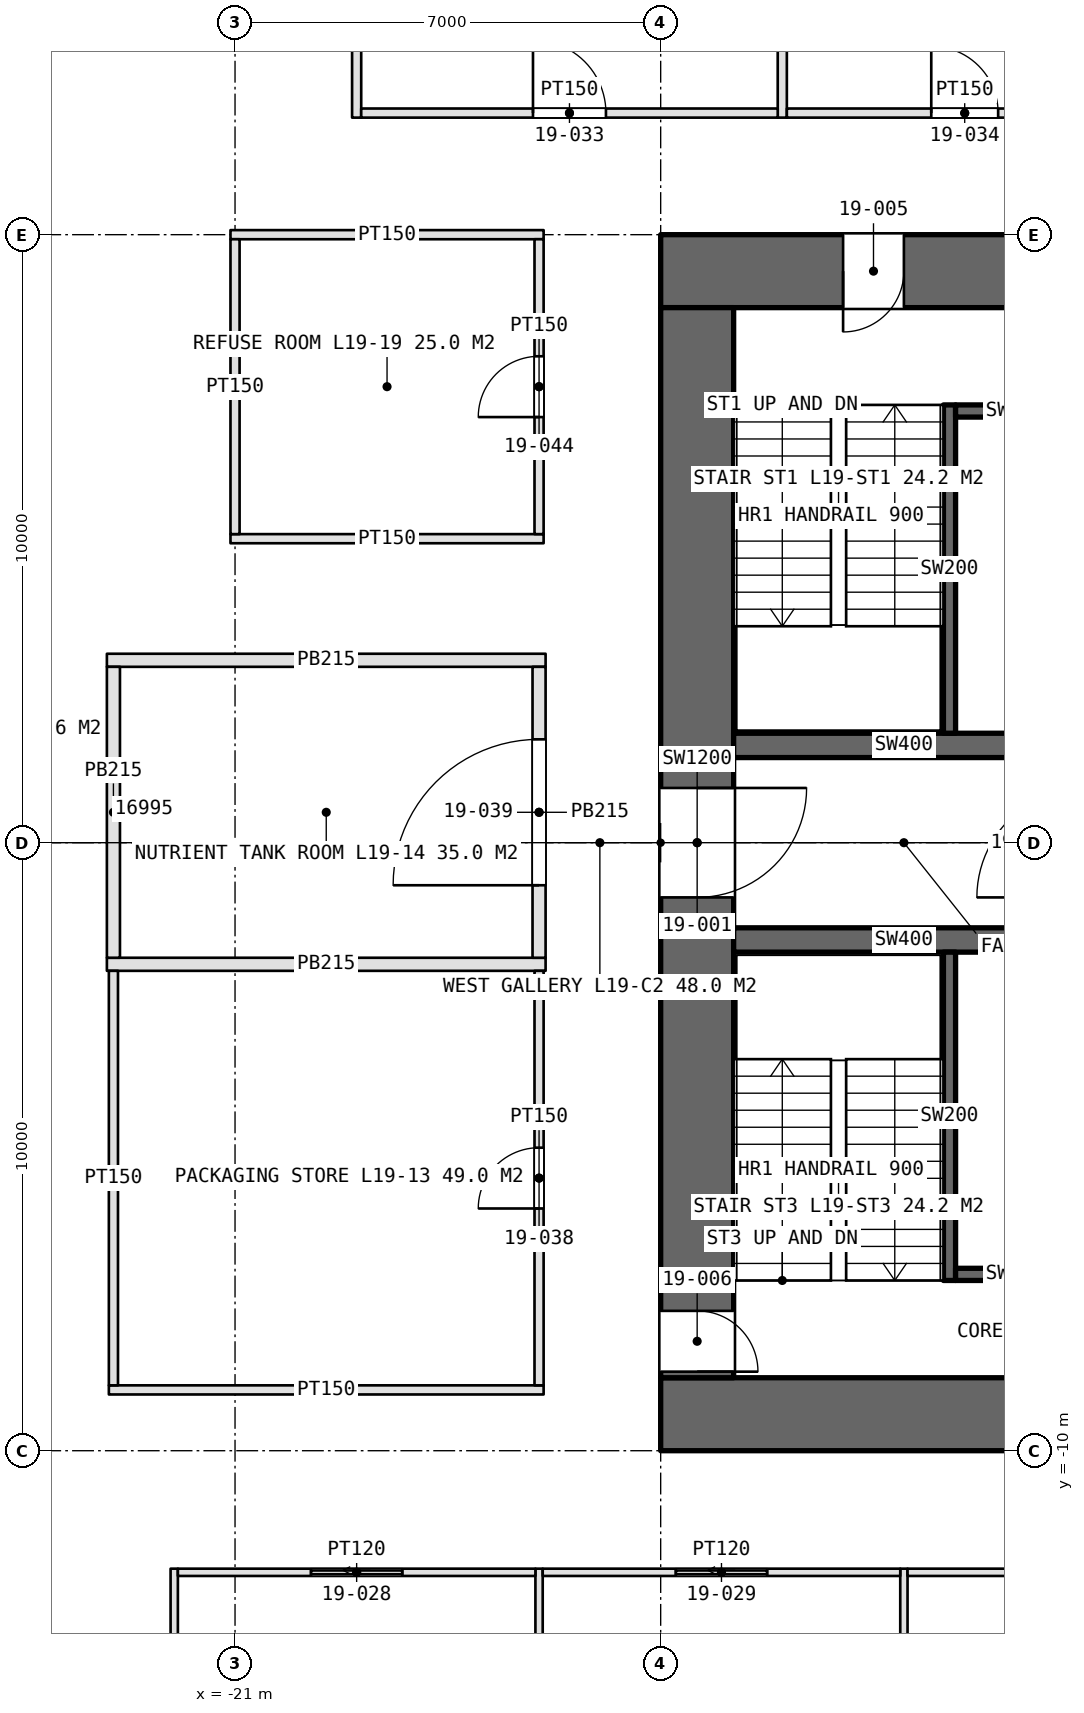
"""IFC4 building model, lengths in metres.
Left out: names, types, materials, properties, quantities, classifications, styles, units other than length and angle.
Written with IfcOpenShell. Run it as: python <this file> out.ifc"""

import sys

from ifc_helpers import new_model, si_unit, direction, frame, frame_2d, origin, place, context, subcontext, project, spatial, rectangle, extrude, element, fill, save


model = new_model("IFC4")
c1 = context("Model", 3, precision=1e-05, world=origin(), true_north=direction((0.0, 1.0)))
c2 = subcontext(c1, "Body", "Model", "MODEL_VIEW")
j1 = project(units=[si_unit("LENGTHUNIT", "METRE"), si_unit("PLANEANGLEUNIT", "RADIAN")], contexts=[c1])
p1 = place(None, origin())
s1 = spatial("IfcSite", under=j1, at=p1, CompositionType="ELEMENT")
p2 = place(p1, origin())
s2 = spatial("IfcBuilding", under=s1, at=p2, CompositionType="ELEMENT")
p3 = place(p2, frame((0.0, 0.0, 95.0)))
s3 = spatial("IfcBuildingStorey", under=s2, at=p3, CompositionType="ELEMENT", Elevation=95.0)
p4 = place(p3, frame((-14.0, -9.4, 0.0), z_axis=(0.0, 0.0, 1.0), x_axis=(1.0, 0.0, 0.0)))
e1 = element("IfcWall", 1, at=p4, inside=s3, PredefinedType="SHEAR", context=c2, shape_type="SweptSolid", body=[
    extrude(rectangle(XDim=28.0, YDim=1.2, at=frame_2d((14.0, 0.0))), origin(), (0.0, 0.0, 1.0), 5.0),
])
p5 = place(p4, frame((13.1, 0.0, 0.0)))
e2 = element("IfcOpeningElement", 2, at=p5, cuts=e1, PredefinedType="OPENING", context=c2, shape_type="SweptSolid", body=[
    extrude(rectangle(XDim=1.8, YDim=2.4, at=frame_2d((0.9, 1.2))), frame((0.0, 0.61, 0.0), z_axis=(0.0, -1.0, 0.0), x_axis=(1.0, 0.0, 0.0)), (0.0, 0.0, 1.0), 1.22),
])
p6 = place(p4, frame((22.9, 0.0, 0.0)))
e3 = element("IfcOpeningElement", 3, at=p6, cuts=e1, PredefinedType="OPENING", context=c2, shape_type="SweptSolid", body=[
    extrude(rectangle(XDim=2.2, YDim=2.7, at=frame_2d((1.1, 1.35))), frame((0.0, 0.61, 0.0), z_axis=(0.0, -1.0, 0.0), x_axis=(1.0, 0.0, 0.0)), (0.0, 0.0, 1.0), 1.22),
])
p7 = place(p3, frame((14.0, 9.4, 0.0), z_axis=(0.0, 0.0, 1.0), x_axis=(-1.0, 0.0, 0.0)))
e4 = element("IfcWall", 4, at=p7, inside=s3, PredefinedType="SHEAR", context=c2, shape_type="SweptSolid", body=[
    extrude(rectangle(XDim=28.0, YDim=1.2, at=frame_2d((14.0, 0.0))), origin(), (0.0, 0.0, 1.0), 5.0),
])
p8 = place(p7, frame((24.0, 0.0, 0.0)))
e5 = element("IfcOpeningElement", 5, at=p8, cuts=e4, PredefinedType="OPENING", context=c2, shape_type="SweptSolid", body=[
    extrude(rectangle(XDim=1.0, YDim=2.4, at=frame_2d((0.5, 1.2))), frame((0.0, 0.61, 0.0), z_axis=(0.0, -1.0, 0.0), x_axis=(1.0, 0.0, 0.0)), (0.0, 0.0, 1.0), 1.22),
])
p9 = place(p7, frame((13.1, 0.0, 0.0)))
e6 = element("IfcOpeningElement", 6, at=p9, cuts=e4, PredefinedType="OPENING", context=c2, shape_type="SweptSolid", body=[
    extrude(rectangle(XDim=1.8, YDim=2.4, at=frame_2d((0.9, 1.2))), frame((0.0, 0.61, 0.0), z_axis=(0.0, -1.0, 0.0), x_axis=(1.0, 0.0, 0.0)), (0.0, 0.0, 1.0), 1.22),
])
p10 = place(p3, frame((-13.4, 8.8, 0.0), z_axis=(0.0, 0.0, 1.0), x_axis=(0.0, -1.0, 0.0)))
e7 = element("IfcWall", 7, at=p10, inside=s3, PredefinedType="SHEAR", context=c2, shape_type="SweptSolid", body=[
    extrude(rectangle(XDim=17.6, YDim=1.2, at=frame_2d((8.8, 0.0))), origin(), (0.0, 0.0, 1.0), 5.0),
])
p11 = place(p10, frame((7.9, 0.0, 0.0)))
e8 = element("IfcOpeningElement", 8, at=p11, cuts=e7, PredefinedType="OPENING", context=c2, shape_type="SweptSolid", body=[
    extrude(rectangle(XDim=1.8, YDim=2.4, at=frame_2d((0.9, 1.2))), frame((0.0, 0.61, 0.0), z_axis=(0.0, -1.0, 0.0), x_axis=(1.0, 0.0, 0.0)), (0.0, 0.0, 1.0), 1.22),
])
p12 = place(p10, frame((16.5, 0.0, 0.0)))
e9 = element("IfcOpeningElement", 9, at=p12, cuts=e7, PredefinedType="OPENING", context=c2, shape_type="SweptSolid", body=[
    extrude(rectangle(XDim=1.0, YDim=2.4, at=frame_2d((0.5, 1.2))), frame((0.0, 0.61, 0.0), z_axis=(0.0, -1.0, 0.0), x_axis=(1.0, 0.0, 0.0)), (0.0, 0.0, 1.0), 1.22),
])
for number, where, z_axis, x_axis in (
    (10, (-12.8, 1.6, 0.0), (0.0, 0.0, 1.0), (1.0, 0.0, 0.0)),
    (11, (-12.8, -1.6, 0.0), (0.0, 0.0, 1.0), (1.0, 0.0, 0.0)),
):
    element("IfcWall", number, at=place(p3, frame(where, z_axis=z_axis, x_axis=x_axis)), inside=s3, PredefinedType="SHEAR", context=c2, shape_type="SweptSolid", body=[
        extrude(rectangle(XDim=5.6, YDim=0.4, at=frame_2d((2.8, 0.0))), origin(), (0.0, 0.0, 1.0), 5.0),
    ])
p13 = place(p3, frame((-9.25, 7.2, 0.0), z_axis=(0.0, 0.0, 1.0), x_axis=(0.0, -1.0, 0.0)))
e12 = element("IfcWall", 12, at=p13, inside=s3, PredefinedType="SOLIDWALL", context=c2, shape_type="SweptSolid", body=[
    extrude(rectangle(XDim=5.4, YDim=0.2, at=frame_2d((2.7, 0.0))), origin(), (0.0, 0.0, 1.0), 5.0),
])
p14 = place(p3, frame((-9.15, 7.1, 0.0), z_axis=(0.0, 0.0, 1.0), x_axis=(1.0, 0.0, 0.0)))
e13 = element("IfcWall", 13, at=p14, inside=s3, PredefinedType="SOLIDWALL", context=c2, shape_type="SweptSolid", body=[
    extrude(rectangle(XDim=1.95, YDim=0.2, at=frame_2d((0.975, 0.0))), origin(), (0.0, 0.0, 1.0), 5.0),
])
p15 = place(p3, frame((-9.25, -7.2, 0.0), z_axis=(0.0, 0.0, 1.0), x_axis=(0.0, 1.0, 0.0)))
e14 = element("IfcWall", 14, at=p15, inside=s3, PredefinedType="SOLIDWALL", context=c2, shape_type="SweptSolid", body=[
    extrude(rectangle(XDim=5.4, YDim=0.2, at=frame_2d((2.7, 0.0))), origin(), (0.0, 0.0, 1.0), 5.0),
])
p16 = place(p3, frame((-9.15, -7.1, 0.0), z_axis=(0.0, 0.0, 1.0), x_axis=(1.0, 0.0, 0.0)))
e15 = element("IfcWall", 15, at=p16, inside=s3, PredefinedType="SOLIDWALL", context=c2, shape_type="SweptSolid", body=[
    extrude(rectangle(XDim=1.95, YDim=0.2, at=frame_2d((0.975, 0.0))), origin(), (0.0, 0.0, 1.0), 5.0),
])
for number, where, z_axis, x_axis in (
    (16, (-22.0, -11.94, 0.0), (0.0, 0.0, 1.0), (0.0, -1.0, 0.0)),
    (17, (-16.0, -11.94, 0.0), (0.0, 0.0, 1.0), (0.0, -1.0, 0.0)),
    (18, (-10.0, -11.94, 0.0), (0.0, 0.0, 1.0), (0.0, -1.0, 0.0)),
):
    element("IfcWall", number, at=place(p3, frame(where, z_axis=z_axis, x_axis=x_axis)), inside=s3, PredefinedType="PARTITIONING", context=c2, shape_type="SweptSolid", body=[
        extrude(rectangle(XDim=6.12, YDim=0.12, at=frame_2d((3.06, 0.0))), origin(), (0.0, 0.0, 1.0), 3.6),
    ])
p17 = place(p3, frame((-21.94, -12.0, 0.0), z_axis=(0.0, 0.0, 1.0), x_axis=(1.0, 0.0, 0.0)))
e19 = element("IfcWall", 19, at=p17, inside=s3, PredefinedType="PARTITIONING", context=c2, shape_type="SweptSolid", body=[
    extrude(rectangle(XDim=5.88, YDim=0.12, at=frame_2d((2.94, 0.0))), origin(), (0.0, 0.0, 1.0), 3.6),
])
p18 = place(p17, frame((2.19, 0.0, 0.0)))
e20 = element("IfcOpeningElement", 20, at=p18, cuts=e19, PredefinedType="OPENING", context=c2, shape_type="SweptSolid", body=[
    extrude(rectangle(XDim=1.5, YDim=2.5, at=frame_2d((0.75, 1.25))), frame((0.0, 0.07, 0.0), z_axis=(0.0, -1.0, 0.0), x_axis=(1.0, 0.0, 0.0)), (0.0, 0.0, 1.0), 0.14),
])
p19 = place(p3, frame((-15.94, -12.0, 0.0), z_axis=(0.0, 0.0, 1.0), x_axis=(1.0, 0.0, 0.0)))
e21 = element("IfcWall", 21, at=p19, inside=s3, PredefinedType="PARTITIONING", context=c2, shape_type="SweptSolid", body=[
    extrude(rectangle(XDim=5.88, YDim=0.12, at=frame_2d((2.94, 0.0))), origin(), (0.0, 0.0, 1.0), 3.6),
])
p20 = place(p19, frame((2.19, 0.0, 0.0)))
e22 = element("IfcOpeningElement", 22, at=p20, cuts=e21, PredefinedType="OPENING", context=c2, shape_type="SweptSolid", body=[
    extrude(rectangle(XDim=1.5, YDim=2.5, at=frame_2d((0.75, 1.25))), frame((0.0, 0.07, 0.0), z_axis=(0.0, -1.0, 0.0), x_axis=(1.0, 0.0, 0.0)), (0.0, 0.0, 1.0), 0.14),
])
p21 = place(p3, frame((-9.94, -12.0, 0.0), z_axis=(0.0, 0.0, 1.0), x_axis=(1.0, 0.0, 0.0)))
e23 = element("IfcWall", 23, at=p21, inside=s3, PredefinedType="PARTITIONING", context=c2, shape_type="SweptSolid", body=[
    extrude(rectangle(XDim=5.88, YDim=0.12, at=frame_2d((2.94, 0.0))), origin(), (0.0, 0.0, 1.0), 3.6),
])
p22 = place(p21, frame((2.19, 0.0, 0.0)))
e24 = element("IfcOpeningElement", 24, at=p22, cuts=e23, PredefinedType="OPENING", context=c2, shape_type="SweptSolid", body=[
    extrude(rectangle(XDim=1.5, YDim=2.5, at=frame_2d((0.75, 1.25))), frame((0.0, 0.07, 0.0), z_axis=(0.0, -1.0, 0.0), x_axis=(1.0, 0.0, 0.0)), (0.0, 0.0, 1.0), 0.14),
])
for number, where, z_axis, x_axis in (
    (25, (-19.0, 11.925, 0.0), (0.0, 0.0, 1.0), (0.0, 1.0, 0.0)),
    (26, (-12.0, 11.925, 0.0), (0.0, 0.0, 1.0), (0.0, 1.0, 0.0)),
):
    element("IfcWall", number, at=place(p3, frame(where, z_axis=z_axis, x_axis=x_axis)), inside=s3, PredefinedType="PARTITIONING", context=c2, shape_type="SweptSolid", body=[
        extrude(rectangle(XDim=8.15, YDim=0.15, at=frame_2d((4.075, 0.0))), origin(), (0.0, 0.0, 1.0), 3.6),
    ])
p23 = place(p3, frame((-18.925, 12.0, 0.0), z_axis=(0.0, 0.0, 1.0), x_axis=(1.0, 0.0, 0.0)))
e27 = element("IfcWall", 27, at=p23, inside=s3, PredefinedType="PARTITIONING", context=c2, shape_type="SweptSolid", body=[
    extrude(rectangle(XDim=6.85, YDim=0.15, at=frame_2d((3.425, 0.0))), origin(), (0.0, 0.0, 1.0), 3.6),
])
p24 = place(p23, frame((2.825, 0.0, 0.0)))
e28 = element("IfcOpeningElement", 28, at=p24, cuts=e27, PredefinedType="OPENING", context=c2, shape_type="SweptSolid", body=[
    extrude(rectangle(XDim=1.2, YDim=2.3, at=frame_2d((0.6, 1.15))), frame((0.0, 0.085, 0.0), z_axis=(0.0, -1.0, 0.0), x_axis=(1.0, 0.0, 0.0)), (0.0, 0.0, 1.0), 0.17),
])
p25 = place(p3, frame((-11.925, 12.0, 0.0), z_axis=(0.0, 0.0, 1.0), x_axis=(1.0, 0.0, 0.0)))
e29 = element("IfcWall", 29, at=p25, inside=s3, PredefinedType="PARTITIONING", context=c2, shape_type="SweptSolid", body=[
    extrude(rectangle(XDim=5.85, YDim=0.15, at=frame_2d((2.925, 0.0))), origin(), (0.0, 0.0, 1.0), 3.6),
])
p26 = place(p25, frame((2.375, 0.0, 0.0)))
e30 = element("IfcOpeningElement", 30, at=p26, cuts=e29, PredefinedType="OPENING", context=c2, shape_type="SweptSolid", body=[
    extrude(rectangle(XDim=1.1, YDim=2.3, at=frame_2d((0.55, 1.15))), frame((0.0, 0.085, 0.0), z_axis=(0.0, -1.0, 0.0), x_axis=(1.0, 0.0, 0.0)), (0.0, 0.0, 1.0), 0.17),
])
p27 = place(p3, frame((-15.925, -9.0, 0.0), z_axis=(0.0, 0.0, 1.0), x_axis=(-1.0, 0.0, 0.0)))
e31 = element("IfcWall", 31, at=p27, inside=s3, PredefinedType="PARTITIONING", context=c2, shape_type="SweptSolid", body=[
    extrude(rectangle(XDim=7.15, YDim=0.15, at=frame_2d((3.575, 0.0))), origin(), (0.0, 0.0, 1.0), 3.6),
])
for number, where, z_axis, x_axis in (
    (32, (-15.893, -2.0, 0.0), (0.0, 0.0, 1.0), (-1.0, 0.0, 0.0)),
    (33, (-15.893, 3.0, 0.0), (0.0, 0.0, 1.0), (-1.0, 0.0, 0.0)),
):
    element("IfcWall", number, at=place(p3, frame(where, z_axis=z_axis, x_axis=x_axis)), inside=s3, PredefinedType="PARTITIONING", context=c2, shape_type="SweptSolid", body=[
        extrude(rectangle(XDim=7.215, YDim=0.215, at=frame_2d((3.607, 0.0))), origin(), (0.0, 0.0, 1.0), 3.6),
    ])
p28 = place(p3, frame((-16.0, -8.925, 0.0), z_axis=(0.0, 0.0, 1.0), x_axis=(0.0, 1.0, 0.0)))
e34 = element("IfcWall", 34, at=p28, inside=s3, PredefinedType="PARTITIONING", context=c2, shape_type="SweptSolid", body=[
    extrude(rectangle(XDim=6.818, YDim=0.15, at=frame_2d((3.409, 0.0))), origin(), (0.0, 0.0, 1.0), 3.6),
])
p29 = place(p28, frame((2.909, 0.0, 0.0)))
e35 = element("IfcOpeningElement", 35, at=p29, cuts=e34, PredefinedType="OPENING", context=c2, shape_type="SweptSolid", body=[
    extrude(rectangle(XDim=1.0, YDim=2.2, at=frame_2d((0.5, 1.1))), frame((0.0, 0.085, 0.0), z_axis=(0.0, -1.0, 0.0), x_axis=(1.0, 0.0, 0.0)), (0.0, 0.0, 1.0), 0.17),
])
p30 = place(p3, frame((-23.0, -8.925, 0.0), z_axis=(0.0, 0.0, 1.0), x_axis=(0.0, 1.0, 0.0)))
e36 = element("IfcWall", 36, at=p30, inside=s3, PredefinedType="PARTITIONING", context=c2, shape_type="SweptSolid", body=[
    extrude(rectangle(XDim=6.818, YDim=0.15, at=frame_2d((3.409, 0.0))), origin(), (0.0, 0.0, 1.0), 3.6),
])
p31 = place(p3, frame((-16.0, -1.893, 0.0), z_axis=(0.0, 0.0, 1.0), x_axis=(0.0, 1.0, 0.0)))
e37 = element("IfcWall", 37, at=p31, inside=s3, PredefinedType="PARTITIONING", context=c2, shape_type="SweptSolid", body=[
    extrude(rectangle(XDim=4.785, YDim=0.215, at=frame_2d((2.393, 0.0))), origin(), (0.0, 0.0, 1.0), 3.6),
])
p32 = place(p31, frame((1.192, 0.0, 0.0)))
e38 = element("IfcOpeningElement", 38, at=p32, cuts=e37, PredefinedType="OPENING", context=c2, shape_type="SweptSolid", body=[
    extrude(rectangle(XDim=2.4, YDim=2.4, at=frame_2d((1.2, 1.2))), frame((0.0, 0.118, 0.0), z_axis=(0.0, -1.0, 0.0), x_axis=(1.0, 0.0, 0.0)), (0.0, 0.0, 1.0), 0.235),
])
p33 = place(p3, frame((-23.0, -1.893, 0.0), z_axis=(0.0, 0.0, 1.0), x_axis=(0.0, 1.0, 0.0)))
e39 = element("IfcWall", 39, at=p33, inside=s3, PredefinedType="PARTITIONING", context=c2, shape_type="SweptSolid", body=[
    extrude(rectangle(XDim=4.785, YDim=0.215, at=frame_2d((2.393, 0.0))), origin(), (0.0, 0.0, 1.0), 3.6),
])
for number, where, z_axis, x_axis in (
    (40, (-15.925, 5.0, 0.0), (0.0, 0.0, 1.0), (-1.0, 0.0, 0.0)),
    (41, (-15.925, 10.0, 0.0), (0.0, 0.0, 1.0), (-1.0, 0.0, 0.0)),
):
    element("IfcWall", number, at=place(p3, frame(where, z_axis=z_axis, x_axis=x_axis)), inside=s3, PredefinedType="PARTITIONING", context=c2, shape_type="SweptSolid", body=[
        extrude(rectangle(XDim=5.15, YDim=0.15, at=frame_2d((2.575, 0.0))), origin(), (0.0, 0.0, 1.0), 3.6),
    ])
p34 = place(p3, frame((-16.0, 5.075, 0.0), z_axis=(0.0, 0.0, 1.0), x_axis=(0.0, 1.0, 0.0)))
e42 = element("IfcWall", 42, at=p34, inside=s3, PredefinedType="PARTITIONING", context=c2, shape_type="SweptSolid", body=[
    extrude(rectangle(XDim=4.85, YDim=0.15, at=frame_2d((2.425, 0.0))), origin(), (0.0, 0.0, 1.0), 3.6),
])
p35 = place(p34, frame((1.925, 0.0, 0.0)))
e43 = element("IfcOpeningElement", 43, at=p35, cuts=e42, PredefinedType="OPENING", context=c2, shape_type="SweptSolid", body=[
    extrude(rectangle(XDim=1.0, YDim=2.2, at=frame_2d((0.5, 1.1))), frame((0.0, 0.085, 0.0), z_axis=(0.0, -1.0, 0.0), x_axis=(1.0, 0.0, 0.0)), (0.0, 0.0, 1.0), 0.17),
])
p36 = place(p3, frame((-21.0, 5.075, 0.0), z_axis=(0.0, 0.0, 1.0), x_axis=(0.0, 1.0, 0.0)))
e44 = element("IfcWall", 44, at=p36, inside=s3, PredefinedType="PARTITIONING", context=c2, shape_type="SweptSolid", body=[
    extrude(rectangle(XDim=4.85, YDim=0.15, at=frame_2d((2.425, 0.0))), origin(), (0.0, 0.0, 1.0), 3.6),
])
p37 = place(p11, origin())
e45 = element("IfcDoor", 45, at=p37, inside=s3, OperationType="DOUBLE_DOOR_SINGLE_SWING", PredefinedType="DOOR", context=c2, shape_type="SweptSolid", body=[
    extrude(rectangle(XDim=1.8, YDim=2.4, at=frame_2d((0.9, 1.2))), frame((0.0, 0.025, 0.0), z_axis=(0.0, -1.0, 0.0), x_axis=(1.0, 0.0, 0.0)), (0.0, 0.0, 1.0), 0.05),
])
fill(e8, e45)
p38 = place(p8, origin())
e46 = element("IfcDoor", 46, at=p38, inside=s3, OperationType="SINGLE_SWING_RIGHT", PredefinedType="DOOR", context=c2, shape_type="SweptSolid", body=[
    extrude(rectangle(XDim=1.0, YDim=2.4, at=frame_2d((0.5, 1.2))), frame((0.0, 0.025, 0.0), z_axis=(0.0, -1.0, 0.0), x_axis=(1.0, 0.0, 0.0)), (0.0, 0.0, 1.0), 0.05),
])
fill(e5, e46)
p39 = place(p12, origin())
e47 = element("IfcDoor", 47, at=p39, inside=s3, OperationType="SINGLE_SWING_RIGHT", PredefinedType="DOOR", context=c2, shape_type="SweptSolid", body=[
    extrude(rectangle(XDim=1.0, YDim=2.4, at=frame_2d((0.5, 1.2))), frame((0.0, 0.025, 0.0), z_axis=(0.0, -1.0, 0.0), x_axis=(1.0, 0.0, 0.0)), (0.0, 0.0, 1.0), 0.05),
])
fill(e9, e47)
p40 = place(p18, origin())
e48 = element("IfcDoor", 48, at=p40, inside=s3, OperationType="SLIDING_TO_LEFT", PredefinedType="DOOR", context=c2, shape_type="SweptSolid", body=[
    extrude(rectangle(XDim=1.5, YDim=2.5, at=frame_2d((0.75, 1.25))), frame((0.0, 0.025, 0.0), z_axis=(0.0, -1.0, 0.0), x_axis=(1.0, 0.0, 0.0)), (0.0, 0.0, 1.0), 0.05),
])
fill(e20, e48)
p41 = place(p20, origin())
e49 = element("IfcDoor", 49, at=p41, inside=s3, OperationType="SLIDING_TO_LEFT", PredefinedType="DOOR", context=c2, shape_type="SweptSolid", body=[
    extrude(rectangle(XDim=1.5, YDim=2.5, at=frame_2d((0.75, 1.25))), frame((0.0, 0.025, 0.0), z_axis=(0.0, -1.0, 0.0), x_axis=(1.0, 0.0, 0.0)), (0.0, 0.0, 1.0), 0.05),
])
fill(e22, e49)
p42 = place(p24, origin())
e50 = element("IfcDoor", 50, at=p42, inside=s3, OperationType="SINGLE_SWING_LEFT", PredefinedType="DOOR", context=c2, shape_type="SweptSolid", body=[
    extrude(rectangle(XDim=1.2, YDim=2.3, at=frame_2d((0.6, 1.15))), frame((0.0, 0.025, 0.0), z_axis=(0.0, -1.0, 0.0), x_axis=(1.0, 0.0, 0.0)), (0.0, 0.0, 1.0), 0.05),
])
fill(e28, e50)
p43 = place(p26, origin())
e51 = element("IfcDoor", 51, at=p43, inside=s3, OperationType="SINGLE_SWING_LEFT", PredefinedType="DOOR", context=c2, shape_type="SweptSolid", body=[
    extrude(rectangle(XDim=1.1, YDim=2.3, at=frame_2d((0.55, 1.15))), frame((0.0, 0.025, 0.0), z_axis=(0.0, -1.0, 0.0), x_axis=(1.0, 0.0, 0.0)), (0.0, 0.0, 1.0), 0.05),
])
fill(e30, e51)
p44 = place(p29, origin())
e52 = element("IfcDoor", 52, at=p44, inside=s3, OperationType="SINGLE_SWING_LEFT", PredefinedType="DOOR", context=c2, shape_type="SweptSolid", body=[
    extrude(rectangle(XDim=1.0, YDim=2.2, at=frame_2d((0.5, 1.1))), frame((0.0, 0.025, 0.0), z_axis=(0.0, -1.0, 0.0), x_axis=(1.0, 0.0, 0.0)), (0.0, 0.0, 1.0), 0.05),
])
fill(e35, e52)
p45 = place(p32, origin())
e53 = element("IfcDoor", 53, at=p45, inside=s3, OperationType="DOUBLE_DOOR_SINGLE_SWING", PredefinedType="DOOR", context=c2, shape_type="SweptSolid", body=[
    extrude(rectangle(XDim=2.4, YDim=2.4, at=frame_2d((1.2, 1.2))), frame((0.0, 0.025, 0.0), z_axis=(0.0, -1.0, 0.0), x_axis=(1.0, 0.0, 0.0)), (0.0, 0.0, 1.0), 0.05),
])
fill(e38, e53)
p46 = place(p35, origin())
e54 = element("IfcDoor", 54, at=p46, inside=s3, OperationType="SINGLE_SWING_LEFT", PredefinedType="DOOR", context=c2, shape_type="SweptSolid", body=[
    extrude(rectangle(XDim=1.0, YDim=2.2, at=frame_2d((0.5, 1.1))), frame((0.0, 0.025, 0.0), z_axis=(0.0, -1.0, 0.0), x_axis=(1.0, 0.0, 0.0)), (0.0, 0.0, 1.0), 0.05),
])
fill(e43, e54)
save(model, sys.argv[1])
